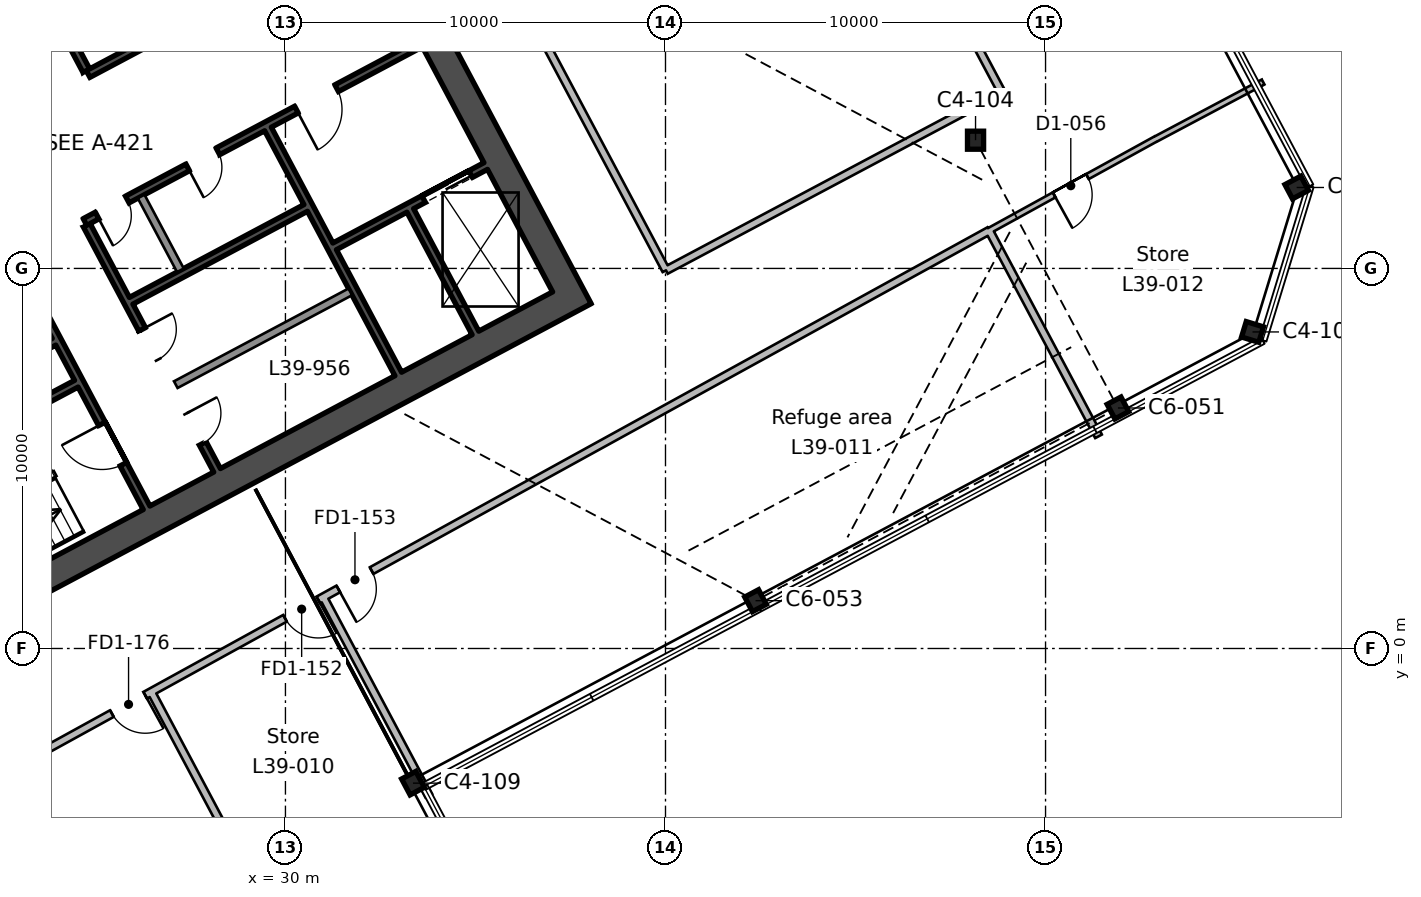
"""IFC4 building model, lengths in metres.
Left out: names, types, materials, properties, quantities, classifications, styles, units other than length and angle.
Written with IfcOpenShell. Run it as: python <this file> out.ifc"""

import sys

from ifc_helpers import new_model, si_unit, direction, frame, frame_2d, origin, origin_2d, place, context, subcontext, project, spatial, rectangle, i_section, extrude, element, fill, save


model = new_model("IFC4")
c1 = context("Model", 3, precision=1e-05, world=origin(), true_north=direction((0.0, 1.0)))
c2 = subcontext(c1, "Body", "Model", "MODEL_VIEW")
j1 = project(units=[si_unit("LENGTHUNIT", "METRE"), si_unit("PLANEANGLEUNIT", "RADIAN")], contexts=[c1])
p1 = place(None, origin())
s1 = spatial("IfcSite", under=j1, at=p1, CompositionType="ELEMENT")
p2 = place(p1, origin())
s2 = spatial("IfcBuilding", under=s1, at=p2, CompositionType="ELEMENT")
p3 = place(p2, frame((0.0, 0.0, 183.6)))
s3 = spatial("IfcBuildingStorey", under=s2, at=p3, CompositionType="ELEMENT", Elevation=183.6)
p4 = place(p3, frame((33.356, -3.543, 0.0), z_axis=(0.0, 0.0, 1.0), x_axis=(0.882947592859, 0.469471562786, 0.0)))
e1 = element("IfcColumn", 1, at=p4, inside=s3, PredefinedType="COLUMN", context=c2, shape_type="SweptSolid", body=[
    extrude(i_section(OverallWidth=0.424, OverallDepth=0.475, WebThickness=0.048, FlangeThickness=0.077, FilletRadius=0.015, at=origin_2d()), origin(), (0.0, 0.0, 1.0), 6.0),
])
for number, where, z_axis, x_axis in (
    (2, (42.369, 1.258, 0.0), (0.0, 0.0, 1.0), (0.883, 0.469, 0.0)),
    (3, (51.905, 6.328, 0.0), (0.0, 0.0, 1.0), (0.883, 0.469, 0.0)),
):
    element("IfcColumn", number, at=place(p3, frame(where, z_axis=z_axis, x_axis=x_axis)), inside=s3, PredefinedType="COLUMN", context=c2, shape_type="SweptSolid", body=[
        extrude(i_section(OverallWidth=0.412, OverallDepth=0.434, WebThickness=0.036, FlangeThickness=0.057, FilletRadius=0.015, at=origin_2d()), origin(), (0.0, 0.0, 1.0), 6.0),
    ])
for number, where, z_axis, x_axis in (
    (4, (55.446, 8.329, 0.0), (0.0, 0.0, 1.0), (0.292, 0.956, 0.0)),
    (5, (56.608, 12.13, 0.0), (0.0, 0.0, 1.0), (-0.469, 0.883, 0.0)),
    (6, (48.158, 13.374, 0.0), (0.0, 0.0, 1.0), (1.0, 0.0, 0.0)),
):
    element("IfcColumn", number, at=place(p3, frame(where, z_axis=z_axis, x_axis=x_axis)), inside=s3, PredefinedType="COLUMN", context=c2, shape_type="SweptSolid", body=[
        extrude(i_section(OverallWidth=0.424, OverallDepth=0.475, WebThickness=0.048, FlangeThickness=0.077, FilletRadius=0.015, at=origin_2d()), origin(), (0.0, 0.0, 1.0), 6.0),
    ])
p5 = place(p3, frame((37.713, 8.896, 0.0), z_axis=(0.0, 0.0, 1.0), x_axis=(-0.469469918705, 0.88294846703, 0.0)))
e7 = element("IfcWall", 7, at=p5, inside=s3, PredefinedType="SHEAR", context=c2, shape_type="SweptSolid", body=[
    extrude(rectangle(XDim=19.7, YDim=0.75, at=frame_2d((9.85, 0.0))), origin(), (0.0, 0.0, 1.0), 6.0),
])
p6 = place(p5, frame((10.45, 0.0, 0.0)))
e8 = element("IfcOpeningElement", 8, at=p6, cuts=e7, PredefinedType="OPENING", context=c2, shape_type="SweptSolid", body=[
    extrude(rectangle(XDim=2.4, YDim=2.4, at=frame_2d((1.2, 1.2))), frame((0.0, 0.385, 0.0), z_axis=(0.0, -1.0, 0.0), x_axis=(1.0, 0.0, 0.0)), (0.0, 0.0, 1.0), 0.77),
])
p7 = place(p3, frame((19.37, -0.432, 0.0), z_axis=(0.0, 0.0, 1.0), x_axis=(0.88294509198, 0.469476266226, 0.0)))
e9 = element("IfcWall", 9, at=p7, inside=s3, PredefinedType="SHEAR", context=c2, shape_type="SweptSolid", body=[
    extrude(rectangle(XDim=20.2, YDim=0.75, at=frame_2d((10.1, 0.0))), origin(), (0.0, 0.0, 1.0), 6.0),
])
p8 = place(p3, frame((26.346, 3.702, 0.0), z_axis=(0.0, 0.0, 1.0), x_axis=(-0.469480409012, 0.88294288918, 0.0)))
e10 = element("IfcWall", 10, at=p8, inside=s3, PredefinedType="SHEAR", context=c2, shape_type="SweptSolid", body=[
    extrude(rectangle(XDim=7.3, YDim=0.2, at=frame_2d((3.65, 0.0))), origin(), (0.0, 0.0, 1.0), 6.0),
])
p9 = place(p8, frame((1.3, 0.0, 0.0)))
e11 = element("IfcOpeningElement", 11, at=p9, cuts=e10, PredefinedType="OPENING", context=c2, shape_type="SweptSolid", body=[
    extrude(rectangle(XDim=1.2, YDim=2.1, at=frame_2d((0.6, 1.05))), frame((0.0, 0.11, 0.0), z_axis=(0.0, -1.0, 0.0), x_axis=(1.0, 0.0, 0.0)), (0.0, 0.0, 1.0), 0.22),
])
p10 = place(p3, frame((28.2, 4.688, 0.0), z_axis=(0.0, 0.0, 1.0), x_axis=(-0.469454336211, 0.882956752176, 0.0)))
e12 = element("IfcWall", 12, at=p10, inside=s3, PredefinedType="SHEAR", context=c2, shape_type="SweptSolid", body=[
    extrude(rectangle(XDim=7.3, YDim=0.2, at=frame_2d((3.65, 0.0))), origin(), (0.0, 0.0, 1.0), 6.0),
])
p11 = place(p10, frame((0.8, 0.0, 0.0)))
e13 = element("IfcOpeningElement", 13, at=p11, cuts=e12, PredefinedType="OPENING", context=c2, shape_type="SweptSolid", body=[
    extrude(rectangle(XDim=0.9, YDim=2.1, at=frame_2d((0.45, 1.05))), frame((0.0, 0.11, 0.0), z_axis=(0.0, -1.0, 0.0), x_axis=(1.0, 0.0, 0.0)), (0.0, 0.0, 1.0), 0.22),
])
p12 = place(p10, frame((3.3, 0.0, 0.0)))
e14 = element("IfcOpeningElement", 14, at=p12, cuts=e12, PredefinedType="OPENING", context=c2, shape_type="SweptSolid", body=[
    extrude(rectangle(XDim=0.9, YDim=2.1, at=frame_2d((0.45, 1.05))), frame((0.0, 0.11, 0.0), z_axis=(0.0, -1.0, 0.0), x_axis=(1.0, 0.0, 0.0)), (0.0, 0.0, 1.0), 0.22),
])
p13 = place(p3, frame((27.236, 9.951, 0.0), z_axis=(0.0, 0.0, 1.0), x_axis=(-0.4694473164, 0.882960484464, 0.0)))
e15 = element("IfcWall", 15, at=p13, inside=s3, PredefinedType="SOLIDWALL", context=c2, shape_type="SweptSolid", body=[
    extrude(rectangle(XDim=2.2, YDim=0.2, at=frame_2d((1.1, 0.0))), origin(), (0.0, 0.0, 1.0), 6.0),
])
p14 = place(p3, frame((24.76, 15.204, 0.0), z_axis=(0.0, 0.0, 1.0), x_axis=(-0.469494272526, 0.882935517501, 0.0)))
e16 = element("IfcWall", 16, at=p14, inside=s3, PredefinedType="SHEAR", context=c2, shape_type="SweptSolid", body=[
    extrude(rectangle(XDim=7.3, YDim=0.2, at=frame_2d((3.65, 0.0))), origin(), (0.0, 0.0, 1.0), 6.0),
])
p15 = place(p14, frame((4.8, 0.0, 0.0)))
e17 = element("IfcOpeningElement", 17, at=p15, cuts=e16, PredefinedType="OPENING", context=c2, shape_type="SweptSolid", body=[
    extrude(rectangle(XDim=1.2, YDim=2.1, at=frame_2d((0.6, 1.05))), frame((0.0, 0.11, 0.0), z_axis=(0.0, -1.0, 0.0), x_axis=(1.0, 0.0, 0.0)), (0.0, 0.0, 1.0), 0.22),
])
p16 = place(p3, frame((32.968, 7.223, 0.0), z_axis=(0.0, 0.0, 1.0), x_axis=(-0.469480409012, 0.88294288918, 0.0)))
e18 = element("IfcWall", 18, at=p16, inside=s3, PredefinedType="SHEAR", context=c2, shape_type="SweptSolid", body=[
    extrude(rectangle(XDim=7.3, YDim=0.2, at=frame_2d((3.65, 0.0))), origin(), (0.0, 0.0, 1.0), 6.0),
])
p17 = place(p3, frame((34.999, 8.303, 0.0), z_axis=(0.0, 0.0, 1.0), x_axis=(-0.4694665462, 0.882950260207, 0.0)))
e19 = element("IfcWall", 19, at=p17, inside=s3, PredefinedType="SHEAR", context=c2, shape_type="SweptSolid", body=[
    extrude(rectangle(XDim=3.65, YDim=0.2, at=frame_2d((1.825, 0.0))), origin(), (0.0, 0.0, 1.0), 6.0),
])
p18 = place(p3, frame((27.115, 6.942, 0.0), z_axis=(0.0, 0.0, 1.0), x_axis=(0.882934506056, 0.469496174655, 0.0)))
e20 = element("IfcWall", 20, at=p18, inside=s3, PredefinedType="SOLIDWALL", context=c2, shape_type="SweptSolid", body=[
    extrude(rectangle(XDim=5.2, YDim=0.2, at=frame_2d((2.6, 0.0))), origin(), (0.0, 0.0, 1.0), 6.0),
])
p19 = place(p3, frame((17.434, 3.21, 0.0), z_axis=(0.0, 0.0, 1.0), x_axis=(0.882940221191, 0.469485426614, 0.0)))
e21 = element("IfcWall", 21, at=p19, inside=s3, PredefinedType="SHEAR", context=c2, shape_type="SweptSolid", body=[
    extrude(rectangle(XDim=8.0, YDim=0.2, at=frame_2d((4.0, 0.0))), origin(), (0.0, 0.0, 1.0), 6.0),
])
p20 = place(p3, frame((31.296, 10.581, 0.0), z_axis=(0.0, 0.0, 1.0), x_axis=(0.882960433586, 0.469447412093, 0.0)))
e22 = element("IfcWall", 22, at=p20, inside=s3, PredefinedType="SHEAR", context=c2, shape_type="SweptSolid", body=[
    extrude(rectangle(XDim=4.5, YDim=0.2, at=frame_2d((2.25, 0.0))), origin(), (0.0, 0.0, 1.0), 6.0),
])
p21 = place(p20, frame((2.65, 0.0, 0.0)))
e23 = element("IfcOpeningElement", 23, at=p21, cuts=e22, PredefinedType="OPENING", context=c2, shape_type="SweptSolid", body=[
    extrude(rectangle(XDim=1.4, YDim=2.4, at=frame_2d((0.7, 1.2))), frame((0.0, 0.11, 0.0), z_axis=(0.0, -1.0, 0.0), x_axis=(1.0, 0.0, 0.0)), (0.0, 0.0, 1.0), 0.22),
])
p22 = place(p3, frame((16.847, 4.314, 0.0), z_axis=(0.0, 0.0, 1.0), x_axis=(0.882940221191, 0.469485426614, 0.0)))
e24 = element("IfcWall", 24, at=p22, inside=s3, PredefinedType="SHEAR", context=c2, shape_type="SweptSolid", body=[
    extrude(rectangle(XDim=8.0, YDim=0.2, at=frame_2d((4.0, 0.0))), origin(), (0.0, 0.0, 1.0), 6.0),
])
p23 = place(p3, frame((25.941, 9.15, 0.0), z_axis=(0.0, 0.0, 1.0), x_axis=(0.882953967957, 0.469459572775, 0.0)))
e25 = element("IfcWall", 25, at=p23, inside=s3, PredefinedType="SHEAR", context=c2, shape_type="SweptSolid", body=[
    extrude(rectangle(XDim=5.2, YDim=0.2, at=frame_2d((2.6, 0.0))), origin(), (0.0, 0.0, 1.0), 6.0),
])
p24 = place(p3, frame((24.726, 11.222, 0.0), z_axis=(0.0, 0.0, 1.0), x_axis=(0.882940221191, 0.469485426614, 0.0)))
e26 = element("IfcWall", 26, at=p24, inside=s3, PredefinedType="SHEAR", context=c2, shape_type="SweptSolid", body=[
    extrude(rectangle(XDim=10.0, YDim=0.2, at=frame_2d((5.0, 0.0))), origin(), (0.0, 0.0, 1.0), 6.0),
])
p25 = place(p24, frame((6.3, 0.0, 0.0)))
e27 = element("IfcOpeningElement", 27, at=p25, cuts=e26, PredefinedType="OPENING", context=c2, shape_type="SweptSolid", body=[
    extrude(rectangle(XDim=1.2, YDim=2.1, at=frame_2d((0.6, 1.05))), frame((0.0, 0.11, 0.0), z_axis=(0.0, -1.0, 0.0), x_axis=(1.0, 0.0, 0.0)), (0.0, 0.0, 1.0), 0.22),
])
p26 = place(p24, frame((0.36, 0.0, 0.0)))
e28 = element("IfcOpeningElement", 28, at=p26, cuts=e26, PredefinedType="OPENING", context=c2, shape_type="SweptSolid", body=[
    extrude(rectangle(XDim=0.9, YDim=2.1, at=frame_2d((0.45, 1.05))), frame((0.0, 0.11, 0.0), z_axis=(0.0, -1.0, 0.0), x_axis=(1.0, 0.0, 0.0)), (0.0, 0.0, 1.0), 0.22),
])
p27 = place(p24, frame((3.06, 0.0, 0.0)))
e29 = element("IfcOpeningElement", 29, at=p27, cuts=e26, PredefinedType="OPENING", context=c2, shape_type="SweptSolid", body=[
    extrude(rectangle(XDim=0.9, YDim=2.1, at=frame_2d((0.45, 1.05))), frame((0.0, 0.11, 0.0), z_axis=(0.0, -1.0, 0.0), x_axis=(1.0, 0.0, 0.0)), (0.0, 0.0, 1.0), 0.22),
])
p28 = place(p3, frame((24.807, 15.116, 0.0), z_axis=(0.0, 0.0, 1.0), x_axis=(0.882942972946, 0.469480251476, 0.0)))
e30 = element("IfcWall", 30, at=p28, inside=s3, PredefinedType="SHEAR", context=c2, shape_type="SweptSolid", body=[
    extrude(rectangle(XDim=5.4, YDim=0.2, at=frame_2d((2.7, 0.0))), origin(), (0.0, 0.0, 1.0), 6.0),
])
p29 = place(p3, frame((0.0, 14.723, 0.0), z_axis=(0.0, 0.0, 1.0), x_axis=(0.882950329887, 0.469466415149, 0.0)))
e31 = element("IfcWall", 31, at=p29, inside=s3, PredefinedType="PARTITIONING", context=c2, shape_type="SweptSolid", body=[
    extrude(rectangle(XDim=49.288, YDim=0.2, at=frame_2d((24.644, 0.0))), origin(), (0.0, 0.0, 1.0), 5.55),
])
p30 = place(p29, frame((23.95, 0.0, 0.0)))
e32 = element("IfcOpeningElement", 32, at=p30, cuts=e31, PredefinedType="OPENING", context=c2, shape_type="SweptSolid", body=[
    extrude(rectangle(XDim=1.0, YDim=2.1, at=frame_2d((0.5, 1.05))), frame((0.0, 0.11, 0.0), z_axis=(0.0, -1.0, 0.0), x_axis=(1.0, 0.0, 0.0)), (0.0, 0.0, 1.0), 0.22),
])
p31 = place(p29, frame((17.95, 0.0, 0.0)))
e33 = element("IfcOpeningElement", 33, at=p31, cuts=e31, PredefinedType="OPENING", context=c2, shape_type="SweptSolid", body=[
    extrude(rectangle(XDim=1.0, YDim=2.1, at=frame_2d((0.5, 1.05))), frame((0.0, 0.11, 0.0), z_axis=(0.0, -1.0, 0.0), x_axis=(1.0, 0.0, 0.0)), (0.0, 0.0, 1.0), 0.22),
])
p32 = place(p29, frame((13.55, 0.0, 0.0)))
e34 = element("IfcOpeningElement", 34, at=p32, cuts=e31, PredefinedType="OPENING", context=c2, shape_type="SweptSolid", body=[
    extrude(rectangle(XDim=1.0, YDim=2.1, at=frame_2d((0.5, 1.05))), frame((0.0, 0.11, 0.0), z_axis=(0.0, -1.0, 0.0), x_axis=(1.0, 0.0, 0.0)), (0.0, 0.0, 1.0), 0.22),
])
p33 = place(p3, frame((48.518, 10.994, 0.0), z_axis=(0.0, 0.0, 1.0), x_axis=(-0.876059599613, -0.482202838986, 0.0)))
e35 = element("IfcWall", 35, at=p33, inside=s3, PredefinedType="PARTITIONING", context=c2, shape_type="SweptSolid", body=[
    extrude(rectangle(XDim=41.2, YDim=0.2, at=frame_2d((20.6, 0.0))), origin(), (0.0, 0.0, 1.0), 5.55),
])
p34 = place(p33, frame((35.651, 0.0, 0.0)))
e36 = element("IfcOpeningElement", 36, at=p34, cuts=e35, PredefinedType="OPENING", context=c2, shape_type="SweptSolid", body=[
    extrude(rectangle(XDim=1.0, YDim=2.1, at=frame_2d((0.5, 1.05))), frame((0.0, 0.11, 0.0), z_axis=(0.0, -1.0, 0.0), x_axis=(1.0, 0.0, 0.0)), (0.0, 0.0, 1.0), 0.22),
])
p35 = place(p33, frame((25.35, 0.0, 0.0)))
e37 = element("IfcOpeningElement", 37, at=p35, cuts=e35, PredefinedType="OPENING", context=c2, shape_type="SweptSolid", body=[
    extrude(rectangle(XDim=1.0, YDim=2.1, at=frame_2d((0.5, 1.05))), frame((0.0, 0.11, 0.0), z_axis=(0.0, -1.0, 0.0), x_axis=(1.0, 0.0, 0.0)), (0.0, 0.0, 1.0), 0.22),
])
p36 = place(p33, frame((20.151, 0.0, 0.0)))
e38 = element("IfcOpeningElement", 38, at=p36, cuts=e35, PredefinedType="OPENING", context=c2, shape_type="SweptSolid", body=[
    extrude(rectangle(XDim=1.0, YDim=2.1, at=frame_2d((0.5, 1.05))), frame((0.0, 0.11, 0.0), z_axis=(0.0, -1.0, 0.0), x_axis=(1.0, 0.0, 0.0)), (0.0, 0.0, 1.0), 0.22),
])
p37 = place(p33, frame((18.55, 0.0, 0.0)))
e39 = element("IfcOpeningElement", 39, at=p37, cuts=e35, PredefinedType="OPENING", context=c2, shape_type="SweptSolid", body=[
    extrude(rectangle(XDim=1.0, YDim=2.1, at=frame_2d((0.5, 1.05))), frame((0.0, 0.11, 0.0), z_axis=(0.0, -1.0, 0.0), x_axis=(1.0, 0.0, 0.0)), (0.0, 0.0, 1.0), 0.22),
])
p38 = place(p3, frame((26.468, -1.143, 0.0), z_axis=(0.0, 0.0, 1.0), x_axis=(0.469435669849, -0.882966676536, 0.0)))
e40 = element("IfcWall", 40, at=p38, inside=s3, PredefinedType="PARTITIONING", context=c2, shape_type="SweptSolid", body=[
    extrude(rectangle(XDim=7.765, YDim=0.2, at=frame_2d((3.882, 0.0))), origin(), (0.0, 0.0, 1.0), 5.55),
])
p39 = place(p3, frame((30.995, 1.349, 0.0), z_axis=(0.0, 0.0, 1.0), x_axis=(0.469470734434, -0.882948033301, 0.0)))
e41 = element("IfcWall", 41, at=p39, inside=s3, PredefinedType="PARTITIONING", context=c2, shape_type="SweptSolid", body=[
    extrude(rectangle(XDim=5.921, YDim=0.2, at=frame_2d((2.96, 0.0))), origin(), (0.0, 0.0, 1.0), 5.55),
])
p40 = place(p3, frame((48.518, 10.994, 0.0), z_axis=(0.0, 0.0, 1.0), x_axis=(0.469396939258, -0.882987266848, 0.0)))
e42 = element("IfcWall", 42, at=p40, inside=s3, PredefinedType="PARTITIONING", context=c2, shape_type="SweptSolid", body=[
    extrude(rectangle(XDim=6.129, YDim=0.2, at=frame_2d((3.064, 0.0))), origin(), (0.0, 0.0, 1.0), 5.55),
])
p41 = place(p3, frame((55.725, 14.905, 0.0), z_axis=(0.0, 0.0, 1.0), x_axis=(-0.883102890865, -0.469179373105, 0.0)))
e43 = element("IfcWall", 43, at=p41, inside=s3, PredefinedType="PARTITIONING", context=c2, shape_type="SweptSolid", body=[
    extrude(rectangle(XDim=3.203, YDim=0.15, at=frame_2d((1.602, 0.0))), origin(), (0.0, 0.0, 1.0), 5.55),
])
p42 = place(p3, frame((48.518, 10.994, 0.0), z_axis=(0.0, 0.0, 1.0), x_axis=(0.875930982576, 0.482436434947, 0.0)))
e44 = element("IfcWall", 44, at=p42, inside=s3, PredefinedType="PARTITIONING", context=c2, shape_type="SweptSolid", body=[
    extrude(rectangle(XDim=4.996, YDim=0.15, at=frame_2d((2.498, 0.0))), origin(), (0.0, 0.0, 1.0), 5.55),
])
p43 = place(p42, frame((1.95, 0.0, 0.0)))
e45 = element("IfcOpeningElement", 45, at=p43, cuts=e44, PredefinedType="OPENING", context=c2, shape_type="SweptSolid", body=[
    extrude(rectangle(XDim=1.0, YDim=2.1, at=frame_2d((0.5, 1.05))), frame((0.0, 0.085, 0.0), z_axis=(0.0, -1.0, 0.0), x_axis=(1.0, 0.0, 0.0)), (0.0, 0.0, 1.0), 0.17),
])
p44 = place(p3, frame((39.453, 32.303, 0.0), z_axis=(0.0, 0.0, 1.0), x_axis=(0.469461333319, -0.882953031887, 0.0)))
e46 = element("IfcWall", 46, at=p44, inside=s3, PredefinedType="PARTITIONING", context=c2, shape_type="SweptSolid", body=[
    extrude(rectangle(XDim=20.0, YDim=0.2, at=frame_2d((10.0, 0.0))), origin(), (0.0, 0.0, 1.0), 5.55),
])
p45 = place(p3, frame((48.842, 14.644, 0.0), z_axis=(0.0, 0.0, 1.0), x_axis=(-0.882924718888, -0.46951457994, 0.0)))
e47 = element("IfcWall", 47, at=p45, inside=s3, PredefinedType="PARTITIONING", context=c2, shape_type="SweptSolid", body=[
    extrude(rectangle(XDim=10.0, YDim=0.2, at=frame_2d((5.0, 0.0))), origin(), (0.0, 0.0, 1.0), 5.55),
])
p46 = place(p3, frame((40.013, 9.949, 0.0), z_axis=(0.0, 0.0, 1.0), x_axis=(-0.469489882812, 0.882937851685, 0.0)))
e48 = element("IfcWall", 48, at=p46, inside=s3, PredefinedType="PARTITIONING", context=c2, shape_type="SweptSolid", body=[
    extrude(rectangle(XDim=20.0, YDim=0.2, at=frame_2d((10.0, 0.0))), origin(), (0.0, 0.0, 1.0), 5.55),
])
p47 = place(p46, frame((9.55, 0.0, 0.0)))
e49 = element("IfcOpeningElement", 49, at=p47, cuts=e48, PredefinedType="OPENING", context=c2, shape_type="SweptSolid", body=[
    extrude(rectangle(XDim=1.0, YDim=2.1, at=frame_2d((0.5, 1.05))), frame((0.0, 0.11, 0.0), z_axis=(0.0, -1.0, 0.0), x_axis=(1.0, 0.0, 0.0)), (0.0, 0.0, 1.0), 0.22),
])
p48 = place(p25, frame((1.2, 0.0, 0.0), z_axis=(0.0, 0.0, 1.0), x_axis=(-1.0, 0.0, 0.0)))
e50 = element("IfcDoor", 50, at=p48, inside=s3, OperationType="SINGLE_SWING_RIGHT", PredefinedType="DOOR", context=c2, shape_type="SweptSolid", body=[
    extrude(rectangle(XDim=1.2, YDim=2.1, at=frame_2d((0.6, 1.05))), frame((0.0, 0.025, 0.0), z_axis=(0.0, -1.0, 0.0), x_axis=(1.0, 0.0, 0.0)), (0.0, 0.0, 1.0), 0.05),
])
fill(e27, e50)
p49 = place(p9, origin())
e51 = element("IfcDoor", 51, at=p49, inside=s3, OperationType="SINGLE_SWING_RIGHT", PredefinedType="DOOR", context=c2, shape_type="SweptSolid", body=[
    extrude(rectangle(XDim=1.2, YDim=2.1, at=frame_2d((0.6, 1.05))), frame((0.0, 0.025, 0.0), z_axis=(0.0, -1.0, 0.0), x_axis=(1.0, 0.0, 0.0)), (0.0, 0.0, 1.0), 0.05),
])
fill(e11, e51)
p50 = place(p26, frame((0.9, 0.0, 0.0), z_axis=(0.0, 0.0, 1.0), x_axis=(-1.0, 0.0, 0.0)))
e52 = element("IfcDoor", 52, at=p50, inside=s3, OperationType="SINGLE_SWING_RIGHT", PredefinedType="DOOR", context=c2, shape_type="SweptSolid", body=[
    extrude(rectangle(XDim=0.9, YDim=2.1, at=frame_2d((0.45, 1.05))), frame((0.0, 0.025, 0.0), z_axis=(0.0, -1.0, 0.0), x_axis=(1.0, 0.0, 0.0)), (0.0, 0.0, 1.0), 0.05),
])
fill(e28, e52)
p51 = place(p27, frame((0.9, 0.0, 0.0), z_axis=(0.0, 0.0, 1.0), x_axis=(-1.0, 0.0, 0.0)))
e53 = element("IfcDoor", 53, at=p51, inside=s3, OperationType="SINGLE_SWING_RIGHT", PredefinedType="DOOR", context=c2, shape_type="SweptSolid", body=[
    extrude(rectangle(XDim=0.9, YDim=2.1, at=frame_2d((0.45, 1.05))), frame((0.0, 0.025, 0.0), z_axis=(0.0, -1.0, 0.0), x_axis=(1.0, 0.0, 0.0)), (0.0, 0.0, 1.0), 0.05),
])
fill(e29, e53)
p52 = place(p21, origin())
e54 = element("IfcDoor", 54, at=p52, inside=s3, OperationType="DOUBLE_DOOR_SLIDING", PredefinedType="DOOR", context=c2, shape_type="SweptSolid", body=[
    extrude(rectangle(XDim=1.4, YDim=2.4, at=frame_2d((0.7, 1.2))), frame((0.0, 0.025, 0.0), z_axis=(0.0, -1.0, 0.0), x_axis=(1.0, 0.0, 0.0)), (0.0, 0.0, 1.0), 0.05),
])
fill(e23, e54)
p53 = place(p11, frame((0.9, 0.0, 0.0), z_axis=(0.0, 0.0, 1.0), x_axis=(-1.0, 0.0, 0.0)))
e55 = element("IfcDoor", 55, at=p53, inside=s3, OperationType="SINGLE_SWING_LEFT", PredefinedType="DOOR", context=c2, shape_type="SweptSolid", body=[
    extrude(rectangle(XDim=0.9, YDim=2.1, at=frame_2d((0.45, 1.05))), frame((0.0, 0.025, 0.0), z_axis=(0.0, -1.0, 0.0), x_axis=(1.0, 0.0, 0.0)), (0.0, 0.0, 1.0), 0.05),
])
fill(e13, e55)
p54 = place(p12, frame((0.9, 0.0, 0.0), z_axis=(0.0, 0.0, 1.0), x_axis=(-1.0, 0.0, 0.0)))
e56 = element("IfcDoor", 56, at=p54, inside=s3, OperationType="SINGLE_SWING_LEFT", PredefinedType="DOOR", context=c2, shape_type="SweptSolid", body=[
    extrude(rectangle(XDim=0.9, YDim=2.1, at=frame_2d((0.45, 1.05))), frame((0.0, 0.025, 0.0), z_axis=(0.0, -1.0, 0.0), x_axis=(1.0, 0.0, 0.0)), (0.0, 0.0, 1.0), 0.05),
])
fill(e14, e56)
p55 = place(p35, origin())
e57 = element("IfcDoor", 57, at=p55, inside=s3, OperationType="SINGLE_SWING_LEFT", PredefinedType="DOOR", context=c2, shape_type="SweptSolid", body=[
    extrude(rectangle(XDim=1.0, YDim=2.1, at=frame_2d((0.5, 1.05))), frame((0.0, 0.025, 0.0), z_axis=(0.0, -1.0, 0.0), x_axis=(1.0, 0.0, 0.0)), (0.0, 0.0, 1.0), 0.05),
])
fill(e37, e57)
p56 = place(p36, origin())
e58 = element("IfcDoor", 58, at=p56, inside=s3, OperationType="SINGLE_SWING_LEFT", PredefinedType="DOOR", context=c2, shape_type="SweptSolid", body=[
    extrude(rectangle(XDim=1.0, YDim=2.1, at=frame_2d((0.5, 1.05))), frame((0.0, 0.025, 0.0), z_axis=(0.0, -1.0, 0.0), x_axis=(1.0, 0.0, 0.0)), (0.0, 0.0, 1.0), 0.05),
])
fill(e38, e58)
p57 = place(p37, origin())
e59 = element("IfcDoor", 59, at=p57, inside=s3, OperationType="SINGLE_SWING_RIGHT", PredefinedType="DOOR", context=c2, shape_type="SweptSolid", body=[
    extrude(rectangle(XDim=1.0, YDim=2.1, at=frame_2d((0.5, 1.05))), frame((0.0, 0.025, 0.0), z_axis=(0.0, -1.0, 0.0), x_axis=(1.0, 0.0, 0.0)), (0.0, 0.0, 1.0), 0.05),
])
fill(e39, e59)
p58 = place(p43, frame((1.0, 0.0, 0.0), z_axis=(0.0, 0.0, 1.0), x_axis=(-1.0, 0.0, 0.0)))
e60 = element("IfcDoor", 60, at=p58, inside=s3, OperationType="SINGLE_SWING_RIGHT", PredefinedType="DOOR", context=c2, shape_type="SweptSolid", body=[
    extrude(rectangle(XDim=1.0, YDim=2.1, at=frame_2d((0.5, 1.05))), frame((0.0, 0.025, 0.0), z_axis=(0.0, -1.0, 0.0), x_axis=(1.0, 0.0, 0.0)), (0.0, 0.0, 1.0), 0.05),
])
fill(e45, e60)
save(model, sys.argv[1])
